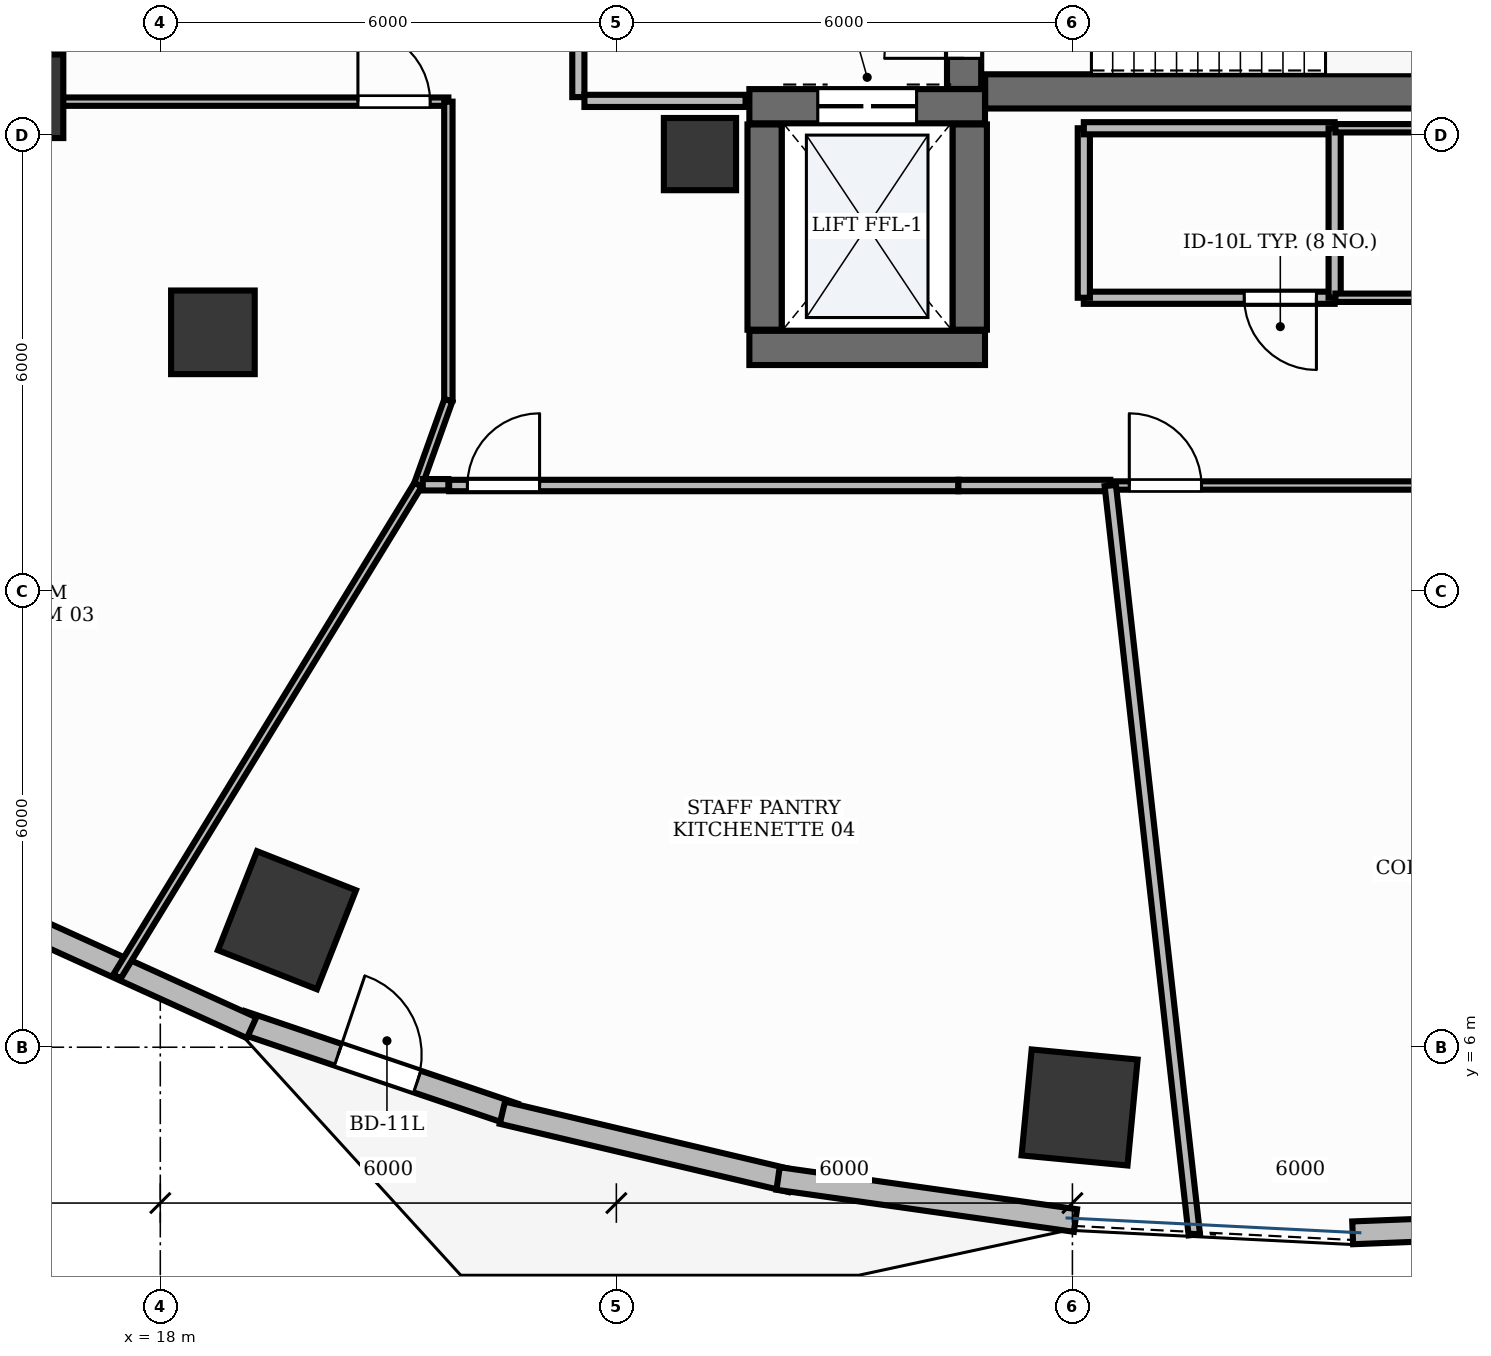
"""IFC4 building model, lengths in metres.
Left out: names, types, materials, properties, quantities, classifications, styles, units other than length and angle.
Written with IfcOpenShell. Run it as: python <this file> out.ifc"""

import sys

from ifc_helpers import new_model, si_unit, direction, frame, frame_2d, origin, origin_2d, place, context, subcontext, project, spatial, rectangle, extrude, element, fill, save


model = new_model("IFC4")
c1 = context("Model", 3, precision=1e-05, world=origin(), true_north=direction((0.0, 1.0)))
c2 = subcontext(c1, "Body", "Model", "MODEL_VIEW")
j1 = project(units=[si_unit("LENGTHUNIT", "METRE"), si_unit("PLANEANGLEUNIT", "RADIAN")], contexts=[c1])
p1 = place(None, origin())
s1 = spatial("IfcSite", under=j1, at=p1, CompositionType="ELEMENT")
p2 = place(p1, origin())
s2 = spatial("IfcBuilding", under=s1, at=p2, CompositionType="ELEMENT")
p3 = place(p2, frame((0.0, 0.0, 72.0)))
s3 = spatial("IfcBuildingStorey", under=s2, at=p3, CompositionType="ELEMENT", Elevation=72.0)
p4 = place(p3, frame((28.852, 18.575, 0.0), z_axis=(0.0, 0.0, 1.0), x_axis=(1.0, 0.0, 0.0)))
e1 = element("IfcWall", 1, at=p4, inside=s3, PredefinedType="SHEAR", context=c2, shape_type="SweptSolid", body=[
    extrude(rectangle(XDim=8.248, YDim=0.45, at=frame_2d((4.124, 0.0))), origin(), (0.0, 0.0, 1.0), 3.9),
])
p5 = place(p3, frame((28.575, 18.607, 0.0), z_axis=(0.0, 0.0, 1.0), x_axis=(0.0, 1.0, 0.0)))
e2 = element("IfcWall", 2, at=p5, inside=s3, PredefinedType="SHEAR", context=c2, shape_type="SweptSolid", body=[
    extrude(rectangle(XDim=3.283, YDim=0.45, at=frame_2d((1.642, 0.0))), origin(), (0.0, 0.0, 1.0), 3.9),
])
p6 = place(p5, frame((0.403, 0.0, 0.0)))
e3 = element("IfcOpeningElement", 3, at=p6, cuts=e2, PredefinedType="OPENING", context=c2, shape_type="SweptSolid", body=[
    extrude(rectangle(XDim=1.05, YDim=2.15, at=frame_2d((0.525, 1.075))), frame((0.0, 0.24, 0.0), z_axis=(0.0, -1.0, 0.0), x_axis=(1.0, 0.0, 0.0)), (0.0, 0.0, 1.0), 0.48),
])
p7 = place(p3, frame((25.75, 15.2, 0.0), z_axis=(0.0, 0.0, 1.0), x_axis=(1.0, 0.0, 0.0)))
e4 = element("IfcWall", 4, at=p7, inside=s3, PredefinedType="SHEAR", context=c2, shape_type="SweptSolid", body=[
    extrude(rectangle(XDim=3.1, YDim=0.45, at=frame_2d((1.55, 0.0))), origin(), (0.0, 0.0, 1.0), 3.9),
])
p8 = place(p3, frame((25.75, 18.38, 0.0), z_axis=(0.0, 0.0, 1.0), x_axis=(1.0, 0.0, 0.0)))
e5 = element("IfcWall", 5, at=p8, inside=s3, PredefinedType="SHEAR", context=c2, shape_type="SweptSolid", body=[
    extrude(rectangle(XDim=3.1, YDim=0.45, at=frame_2d((1.55, 0.0))), origin(), (0.0, 0.0, 1.0), 3.9),
])
p9 = place(p8, frame((0.9, 0.0, 0.0)))
e6 = element("IfcOpeningElement", 6, at=p9, cuts=e5, PredefinedType="OPENING", context=c2, shape_type="SweptSolid", body=[
    extrude(rectangle(XDim=1.3, YDim=2.2, at=frame_2d((0.65, 1.1))), frame((0.0, 0.24, 0.0), z_axis=(0.0, -1.0, 0.0), x_axis=(1.0, 0.0, 0.0)), (0.0, 0.0, 1.0), 0.48),
])
for number, where, z_axis, x_axis in (
    (7, (25.95, 15.44, 0.0), (0.0, 0.0, 1.0), (0.0, 1.0, 0.0)),
    (8, (28.65, 15.44, 0.0), (0.0, 0.0, 1.0), (0.0, 1.0, 0.0)),
):
    element("IfcWall", number, at=place(p3, frame(where, z_axis=z_axis, x_axis=x_axis)), inside=s3, PredefinedType="SHEAR", context=c2, shape_type="SweptSolid", body=[
        extrude(rectangle(XDim=2.7, YDim=0.45, at=frame_2d((1.35, 0.0))), origin(), (0.0, 0.0, 1.0), 3.9),
    ])
p10 = place(p3, frame((25.1, 17.75, -0.0), z_axis=(0.0, 0.0, 1.0), x_axis=(1.0, 0.0, 0.0)))
e9 = element("IfcColumn", 9, at=p10, inside=s3, PredefinedType="PILASTER", context=c2, shape_type="SweptSolid", body=[
    extrude(rectangle(XDim=0.95, YDim=0.95, at=origin_2d()), origin(), (0.0, 0.0, 1.0), 3.901),
])
for number, where, z_axis, x_axis in (
    (10, (16.174, 18.511, -0.0), (0.0, 0.0, 1.0), (1.0, 0.0, 0.0)),
    (11, (18.692, 15.405, -0.0), (0.0, 0.0, 1.0), (1.0, 0.0, 0.0)),
):
    element("IfcColumn", number, at=place(p3, frame(where, z_axis=z_axis, x_axis=x_axis)), inside=s3, PredefinedType="COLUMN", context=c2, shape_type="SweptSolid", body=[
        extrude(rectangle(XDim=1.1, YDim=1.1, at=origin_2d()), origin(), (0.0, 0.0, 1.0), 3.901),
    ])
for number, where, z_axis, x_axis in (
    (12, (19.667, 7.671, -0.0), (0.0, 0.0, 1.0), (-0.93, 0.367, 0.0)),
    (13, (30.094, 5.208, -0.0), (0.0, 0.0, 1.0), (-0.995, 0.095, 0.0)),
):
    element("IfcColumn", number, at=place(p3, frame(where, z_axis=z_axis, x_axis=x_axis)), inside=s3, PredefinedType="COLUMN", context=c2, shape_type="SweptSolid", body=[
        extrude(rectangle(XDim=1.4, YDim=1.4, at=origin_2d()), origin(), (0.0, 0.0, 1.0), 3.901),
    ])
p11 = place(p3, frame((19.065, 6.333, 0.0), z_axis=(0.0, 0.0, 1.0), x_axis=(0.947034337234, -0.321132315564, 0.0)))
e14 = element("IfcWall", 14, at=p11, inside=s3, PredefinedType="STANDARD", context=c2, shape_type="SweptSolid", body=[
    extrude(rectangle(XDim=3.79, YDim=0.3, at=frame_2d((1.895, 0.0))), origin(), (0.0, 0.0, 1.0), 3.47),
])
p12 = place(p11, frame((1.345, 0.0, 0.0)))
e15 = element("IfcOpeningElement", 15, at=p12, cuts=e14, PredefinedType="OPENING", context=c2, shape_type="SweptSolid", body=[
    extrude(rectangle(XDim=1.1, YDim=2.15, at=frame_2d((0.55, 1.075))), frame((0.0, 0.165, 0.0), z_axis=(0.0, -1.0, 0.0), x_axis=(1.0, 0.0, 0.0)), (0.0, 0.0, 1.0), 0.33),
])
p13 = place(p3, frame((33.687, 3.558, 0.0), z_axis=(0.0, 0.0, 1.0), x_axis=(0.999247008469, 0.038799691558, 0.0)))
e16 = element("IfcWall", 16, at=p13, inside=s3, PredefinedType="STANDARD", context=c2, shape_type="SweptSolid", body=[
    extrude(rectangle(XDim=3.939, YDim=0.3, at=frame_2d((1.969, 0.0))), origin(), (0.0, 0.0, 1.0), 3.9),
])
p14 = place(p13, frame((1.219, 0.0, 0.95)))
e17 = element("IfcOpeningElement", 17, at=p14, cuts=e16, PredefinedType="OPENING", context=c2, shape_type="SweptSolid", body=[
    extrude(rectangle(XDim=1.5, YDim=1.8, at=frame_2d((0.75, 0.9))), frame((0.0, 0.165, 0.0), z_axis=(0.0, -1.0, 0.0), x_axis=(1.0, 0.0, 0.0)), (0.0, 0.0, 1.0), 0.33),
])
p15 = place(p3, frame((15.796, 7.802, 0.0), z_axis=(0.0, 0.0, 1.0), x_axis=(0.910623406862, -0.413237233166, 0.0)))
e18 = element("IfcWall", 18, at=p15, inside=s3, PredefinedType="STANDARD", context=c2, shape_type="SweptSolid", body=[
    extrude(rectangle(XDim=3.74, YDim=0.3, at=frame_2d((1.87, 0.0))), origin(), (0.0, 0.0, 1.0), 3.9),
])
p16 = place(p3, frame((22.5, 5.138, 0.0), z_axis=(0.0, 0.0, 1.0), x_axis=(0.973197600754, -0.229970497863, 0.0)))
e19 = element("IfcWall", 19, at=p16, inside=s3, PredefinedType="STANDARD", context=c2, shape_type="SweptSolid", body=[
    extrude(rectangle(XDim=3.901, YDim=0.3, at=frame_2d((1.951, 0.0))), origin(), (0.0, 0.0, 1.0), 3.9),
])
p17 = place(p3, frame((26.128, 4.273, 0.0), z_axis=(0.0, 0.0, 1.0), x_axis=(0.990165832998, -0.139898617443, 0.0)))
e20 = element("IfcWall", 20, at=p17, inside=s3, PredefinedType="STANDARD", context=c2, shape_type="SweptSolid", body=[
    extrude(rectangle(XDim=3.951, YDim=0.3, at=frame_2d((1.976, 0.0))), origin(), (0.0, 0.0, 1.0), 3.47),
])
p18 = place(p3, frame((23.5, 18.5, 0.0), z_axis=(0.0, 0.0, 1.0), x_axis=(0.0, 1.0, 0.0)))
e21 = element("IfcWall", 21, at=p18, inside=s3, PredefinedType="PARTITIONING", context=c2, shape_type="SweptSolid", body=[
    extrude(rectangle(XDim=3.4, YDim=0.16, at=frame_2d((1.7, 0.0))), origin(), (0.0, 0.0, 1.0), 2.91),
])
p19 = place(p18, frame((1.175, 0.0, 0.0)))
e22 = element("IfcOpeningElement", 22, at=p19, cuts=e21, PredefinedType="OPENING", context=c2, shape_type="SweptSolid", body=[
    extrude(rectangle(XDim=1.05, YDim=2.15, at=frame_2d((0.525, 1.075))), frame((0.0, 0.095, 0.0), z_axis=(0.0, -1.0, 0.0), x_axis=(1.0, 0.0, 0.0)), (0.0, 0.0, 1.0), 0.19),
])
p20 = place(p3, frame((23.58, 18.45, 0.0), z_axis=(0.0, 0.0, 1.0), x_axis=(1.0, 0.0, 0.0)))
e23 = element("IfcWall", 23, at=p20, inside=s3, PredefinedType="PARTITIONING", context=c2, shape_type="SweptSolid", body=[
    extrude(rectangle(XDim=2.12, YDim=0.16, at=frame_2d((1.06, 0.0))), origin(), (0.0, 0.0, 1.0), 2.91),
])
p21 = place(p3, frame((33.45, 15.86, 0.0), z_axis=(0.0, 0.0, 1.0), x_axis=(-1.0, 0.0, 0.0)))
e24 = element("IfcWall", 24, at=p21, inside=s3, PredefinedType="PARTITIONING", context=c2, shape_type="SweptSolid", body=[
    extrude(rectangle(XDim=3.3, YDim=0.16, at=frame_2d((1.65, 0.0))), origin(), (0.0, 0.0, 1.0), 2.91),
])
p22 = place(p21, frame((0.24, 0.0, 0.0)))
e25 = element("IfcOpeningElement", 25, at=p22, cuts=e24, PredefinedType="OPENING", context=c2, shape_type="SweptSolid", body=[
    extrude(rectangle(XDim=0.95, YDim=2.15, at=frame_2d((0.475, 1.075))), frame((0.0, 0.095, 0.0), z_axis=(0.0, -1.0, 0.0), x_axis=(1.0, 0.0, 0.0)), (0.0, 0.0, 1.0), 0.19),
])
p23 = place(p3, frame((14.211, 18.44, 0.0), z_axis=(0.0, 0.0, 1.0), x_axis=(1.0, 0.0, 0.0)))
e26 = element("IfcWall", 26, at=p23, inside=s3, PredefinedType="MOVABLE", context=c2, shape_type="SweptSolid", body=[
    extrude(rectangle(XDim=7.579, YDim=0.11, at=frame_2d((3.79, 0.0))), origin(), (0.0, 0.0, 1.0), 2.91),
])
p24 = place(p23, frame((6.389, 0.0, 0.0)))
e27 = element("IfcOpeningElement", 27, at=p24, cuts=e26, PredefinedType="OPENING", context=c2, shape_type="SweptSolid", body=[
    extrude(rectangle(XDim=0.95, YDim=2.15, at=frame_2d((0.475, 1.075))), frame((0.0, 0.07, 0.0), z_axis=(0.0, -1.0, 0.0), x_axis=(1.0, 0.0, 0.0)), (0.0, 0.0, 1.0), 0.14),
])
p25 = place(p3, frame((21.8, 13.39, 0.0), z_axis=(0.0, 0.0, 1.0), x_axis=(1.0, 0.0, 0.0)))
e28 = element("IfcWall", 28, at=p25, inside=s3, PredefinedType="PARTITIONING", context=c2, shape_type="SweptSolid", body=[
    extrude(rectangle(XDim=6.7, YDim=0.15, at=frame_2d((3.35, 0.0))), origin(), (0.0, 0.0, 1.0), 2.91),
])
p26 = place(p25, frame((0.24, 0.0, 0.0)))
e29 = element("IfcOpeningElement", 29, at=p26, cuts=e28, PredefinedType="OPENING", context=c2, shape_type="SweptSolid", body=[
    extrude(rectangle(XDim=0.95, YDim=2.15, at=frame_2d((0.475, 1.075))), frame((0.0, 0.09, 0.0), z_axis=(0.0, -1.0, 0.0), x_axis=(1.0, 0.0, 0.0)), (0.0, 0.0, 1.0), 0.18),
])
p27 = place(p3, frame((30.508, 13.39, 0.0), z_axis=(0.0, 0.0, 1.0), x_axis=(1.0, 0.0, 0.0)))
e30 = element("IfcWall", 30, at=p27, inside=s3, PredefinedType="MOVABLE", context=c2, shape_type="SweptSolid", body=[
    extrude(rectangle(XDim=5.092, YDim=0.11, at=frame_2d((2.546, 0.0))), origin(), (0.0, 0.0, 1.0), 2.91),
])
p28 = place(p27, frame((0.24, 0.0, 0.0)))
e31 = element("IfcOpeningElement", 31, at=p28, cuts=e30, PredefinedType="OPENING", context=c2, shape_type="SweptSolid", body=[
    extrude(rectangle(XDim=0.95, YDim=2.15, at=frame_2d((0.475, 1.075))), frame((0.0, 0.07, 0.0), z_axis=(0.0, -1.0, 0.0), x_axis=(1.0, 0.0, 0.0)), (0.0, 0.0, 1.0), 0.14),
])
p29 = place(p3, frame((30.15, 15.86, 0.0), z_axis=(0.0, 0.0, 1.0), x_axis=(0.0, 1.0, 0.0)))
e32 = element("IfcWall", 32, at=p29, inside=s3, PredefinedType="PARTITIONING", context=c2, shape_type="SweptSolid", body=[
    extrude(rectangle(XDim=2.23, YDim=0.16, at=frame_2d((1.115, 0.0))), origin(), (0.0, 0.0, 1.0), 2.91),
])
p30 = place(p3, frame((30.15, 18.09, 0.0), z_axis=(0.0, 0.0, 1.0), x_axis=(1.0, 0.0, 0.0)))
e33 = element("IfcWall", 33, at=p30, inside=s3, PredefinedType="PARTITIONING", context=c2, shape_type="SweptSolid", body=[
    extrude(rectangle(XDim=3.3, YDim=0.16, at=frame_2d((1.65, 0.0))), origin(), (0.0, 0.0, 1.0), 2.91),
])
p31 = place(p3, frame((33.45, 18.09, 0.0), z_axis=(0.0, 0.0, 1.0), x_axis=(0.0, -1.0, 0.0)))
e34 = element("IfcWall", 34, at=p31, inside=s3, PredefinedType="PARTITIONING", context=c2, shape_type="SweptSolid", body=[
    extrude(rectangle(XDim=2.23, YDim=0.16, at=frame_2d((1.115, 0.0))), origin(), (0.0, 0.0, 1.0), 2.91),
])
p32 = place(p3, frame((21.79, 18.44, 0.0), z_axis=(0.0, 0.0, 1.0), x_axis=(0.0, -1.0, 0.0)))
e35 = element("IfcWall", 35, at=p32, inside=s3, PredefinedType="MOVABLE", context=c2, shape_type="SweptSolid", body=[
    extrude(rectangle(XDim=3.929, YDim=0.11, at=frame_2d((1.964, 0.0))), origin(), (0.0, 0.0, 1.0), 2.91),
])
p33 = place(p3, frame((21.79, 14.511, 0.0), z_axis=(0.0, 0.0, 1.0), x_axis=(-0.337672177142, -0.941263778536, 0.0)))
e36 = element("IfcWall", 36, at=p33, inside=s3, PredefinedType="MOVABLE", context=c2, shape_type="SweptSolid", body=[
    extrude(rectangle(XDim=1.181, YDim=0.11, at=frame_2d((0.59, 0.0))), origin(), (0.0, 0.0, 1.0), 2.91),
])
p34 = place(p3, frame((21.391, 13.4, 0.0), z_axis=(0.0, 0.0, 1.0), x_axis=(-0.522118984401, -0.852872655282, 0.0)))
e37 = element("IfcWall", 37, at=p34, inside=s3, PredefinedType="MOVABLE", context=c2, shape_type="SweptSolid", body=[
    extrude(rectangle(XDim=7.586, YDim=0.11, at=frame_2d((3.793, 0.0))), origin(), (0.0, 0.0, 1.0), 2.91),
])
p35 = place(p3, frame((28.5, 13.39, 0.0), z_axis=(0.0, 0.0, 1.0), x_axis=(1.0, 0.0, 0.0)))
e38 = element("IfcWall", 38, at=p35, inside=s3, PredefinedType="PARTITIONING", context=c2, shape_type="SweptSolid", body=[
    extrude(rectangle(XDim=1.998, YDim=0.15, at=frame_2d((0.999, 0.0))), origin(), (0.0, 0.0, 1.0), 2.91),
])
p36 = place(p3, frame((30.498, 13.39, 0.0), z_axis=(0.0, 0.0, 1.0), x_axis=(0.11147423436, -0.993767324414, 0.0)))
e39 = element("IfcWall", 39, at=p36, inside=s3, PredefinedType="PARTITIONING", context=c2, shape_type="SweptSolid", body=[
    extrude(rectangle(XDim=9.919, YDim=0.15, at=frame_2d((4.959, 0.0))), origin(), (0.0, 0.0, 1.0), 2.91),
])
p37 = place(p3, frame((21.453, 13.4, 0.0), z_axis=(0.0, 0.0, 1.0), x_axis=(1.0, 0.0, 0.0)))
e40 = element("IfcWall", 40, at=p37, inside=s3, PredefinedType="PARTITIONING", context=c2, shape_type="SweptSolid", body=[
    extrude(rectangle(XDim=0.337, YDim=0.15, at=frame_2d((0.168, 0.0))), origin(), (0.0, 0.0, 1.0), 2.91),
])
p38 = place(p3, frame((36.4, 15.86, 0.0), z_axis=(0.0, 0.0, 1.0), x_axis=(-1.0, 0.0, 0.0)))
e41 = element("IfcWall", 41, at=p38, inside=s3, PredefinedType="MOVABLE", context=c2, shape_type="SweptSolid", body=[
    extrude(rectangle(XDim=2.94, YDim=0.11, at=frame_2d((1.47, 0.0))), origin(), (0.0, 0.0, 1.0), 2.91),
])
p39 = place(p3, frame((33.46, 18.09, 0.0), z_axis=(0.0, 0.0, 1.0), x_axis=(1.0, 0.0, 0.0)))
e42 = element("IfcWall", 42, at=p39, inside=s3, PredefinedType="MOVABLE", context=c2, shape_type="SweptSolid", body=[
    extrude(rectangle(XDim=3.89, YDim=0.11, at=frame_2d((1.945, 0.0))), origin(), (0.0, 0.0, 1.0), 2.91),
])
p40 = place(p12, origin())
e43 = element("IfcDoor", 43, at=p40, inside=s3, OperationType="SINGLE_SWING_LEFT", PredefinedType="DOOR", context=c2, shape_type="SweptSolid", body=[
    extrude(rectangle(XDim=1.1, YDim=2.15, at=frame_2d((0.55, 1.075))), frame((0.0, 0.025, 0.0), z_axis=(0.0, -1.0, 0.0), x_axis=(1.0, 0.0, 0.0)), (0.0, 0.0, 1.0), 0.05),
])
fill(e15, e43)
p41 = place(p6, origin())
e44 = element("IfcDoor", 44, at=p41, inside=s3, OperationType="SINGLE_SWING_LEFT", PredefinedType="DOOR", context=c2, shape_type="SweptSolid", body=[
    extrude(rectangle(XDim=1.05, YDim=2.15, at=frame_2d((0.525, 1.075))), frame((0.0, 0.025, 0.0), z_axis=(0.0, -1.0, 0.0), x_axis=(1.0, 0.0, 0.0)), (0.0, 0.0, 1.0), 0.05),
])
fill(e3, e44)
p42 = place(p9, origin())
e45 = element("IfcDoor", 45, at=p42, inside=s3, OperationType="DOUBLE_DOOR_SLIDING", PredefinedType="DOOR", context=c2, shape_type="SweptSolid", body=[
    extrude(rectangle(XDim=1.3, YDim=2.2, at=frame_2d((0.65, 1.1))), frame((0.0, 0.025, 0.0), z_axis=(0.0, -1.0, 0.0), x_axis=(1.0, 0.0, 0.0)), (0.0, 0.0, 1.0), 0.05),
])
fill(e6, e45)
p43 = place(p22, origin())
e46 = element("IfcDoor", 46, at=p43, inside=s3, OperationType="SINGLE_SWING_LEFT", PredefinedType="DOOR", context=c2, shape_type="SweptSolid", body=[
    extrude(rectangle(XDim=0.95, YDim=2.15, at=frame_2d((0.475, 1.075))), frame((0.0, 0.025, 0.0), z_axis=(0.0, -1.0, 0.0), x_axis=(1.0, 0.0, 0.0)), (0.0, 0.0, 1.0), 0.05),
])
fill(e25, e46)
p44 = place(p24, origin())
e47 = element("IfcDoor", 47, at=p44, inside=s3, OperationType="SINGLE_SWING_LEFT", PredefinedType="DOOR", context=c2, shape_type="SweptSolid", body=[
    extrude(rectangle(XDim=0.95, YDim=2.15, at=frame_2d((0.475, 1.075))), frame((0.0, 0.025, 0.0), z_axis=(0.0, -1.0, 0.0), x_axis=(1.0, 0.0, 0.0)), (0.0, 0.0, 1.0), 0.05),
])
fill(e27, e47)
p45 = place(p26, origin())
e48 = element("IfcDoor", 48, at=p45, inside=s3, OperationType="SINGLE_SWING_RIGHT", PredefinedType="DOOR", context=c2, shape_type="SweptSolid", body=[
    extrude(rectangle(XDim=0.95, YDim=2.15, at=frame_2d((0.475, 1.075))), frame((0.0, 0.025, 0.0), z_axis=(0.0, -1.0, 0.0), x_axis=(1.0, 0.0, 0.0)), (0.0, 0.0, 1.0), 0.05),
])
fill(e29, e48)
p46 = place(p28, origin())
e49 = element("IfcDoor", 49, at=p46, inside=s3, OperationType="SINGLE_SWING_LEFT", PredefinedType="DOOR", context=c2, shape_type="SweptSolid", body=[
    extrude(rectangle(XDim=0.95, YDim=2.15, at=frame_2d((0.475, 1.075))), frame((0.0, 0.025, 0.0), z_axis=(0.0, -1.0, 0.0), x_axis=(1.0, 0.0, 0.0)), (0.0, 0.0, 1.0), 0.05),
])
fill(e31, e49)
save(model, sys.argv[1])
